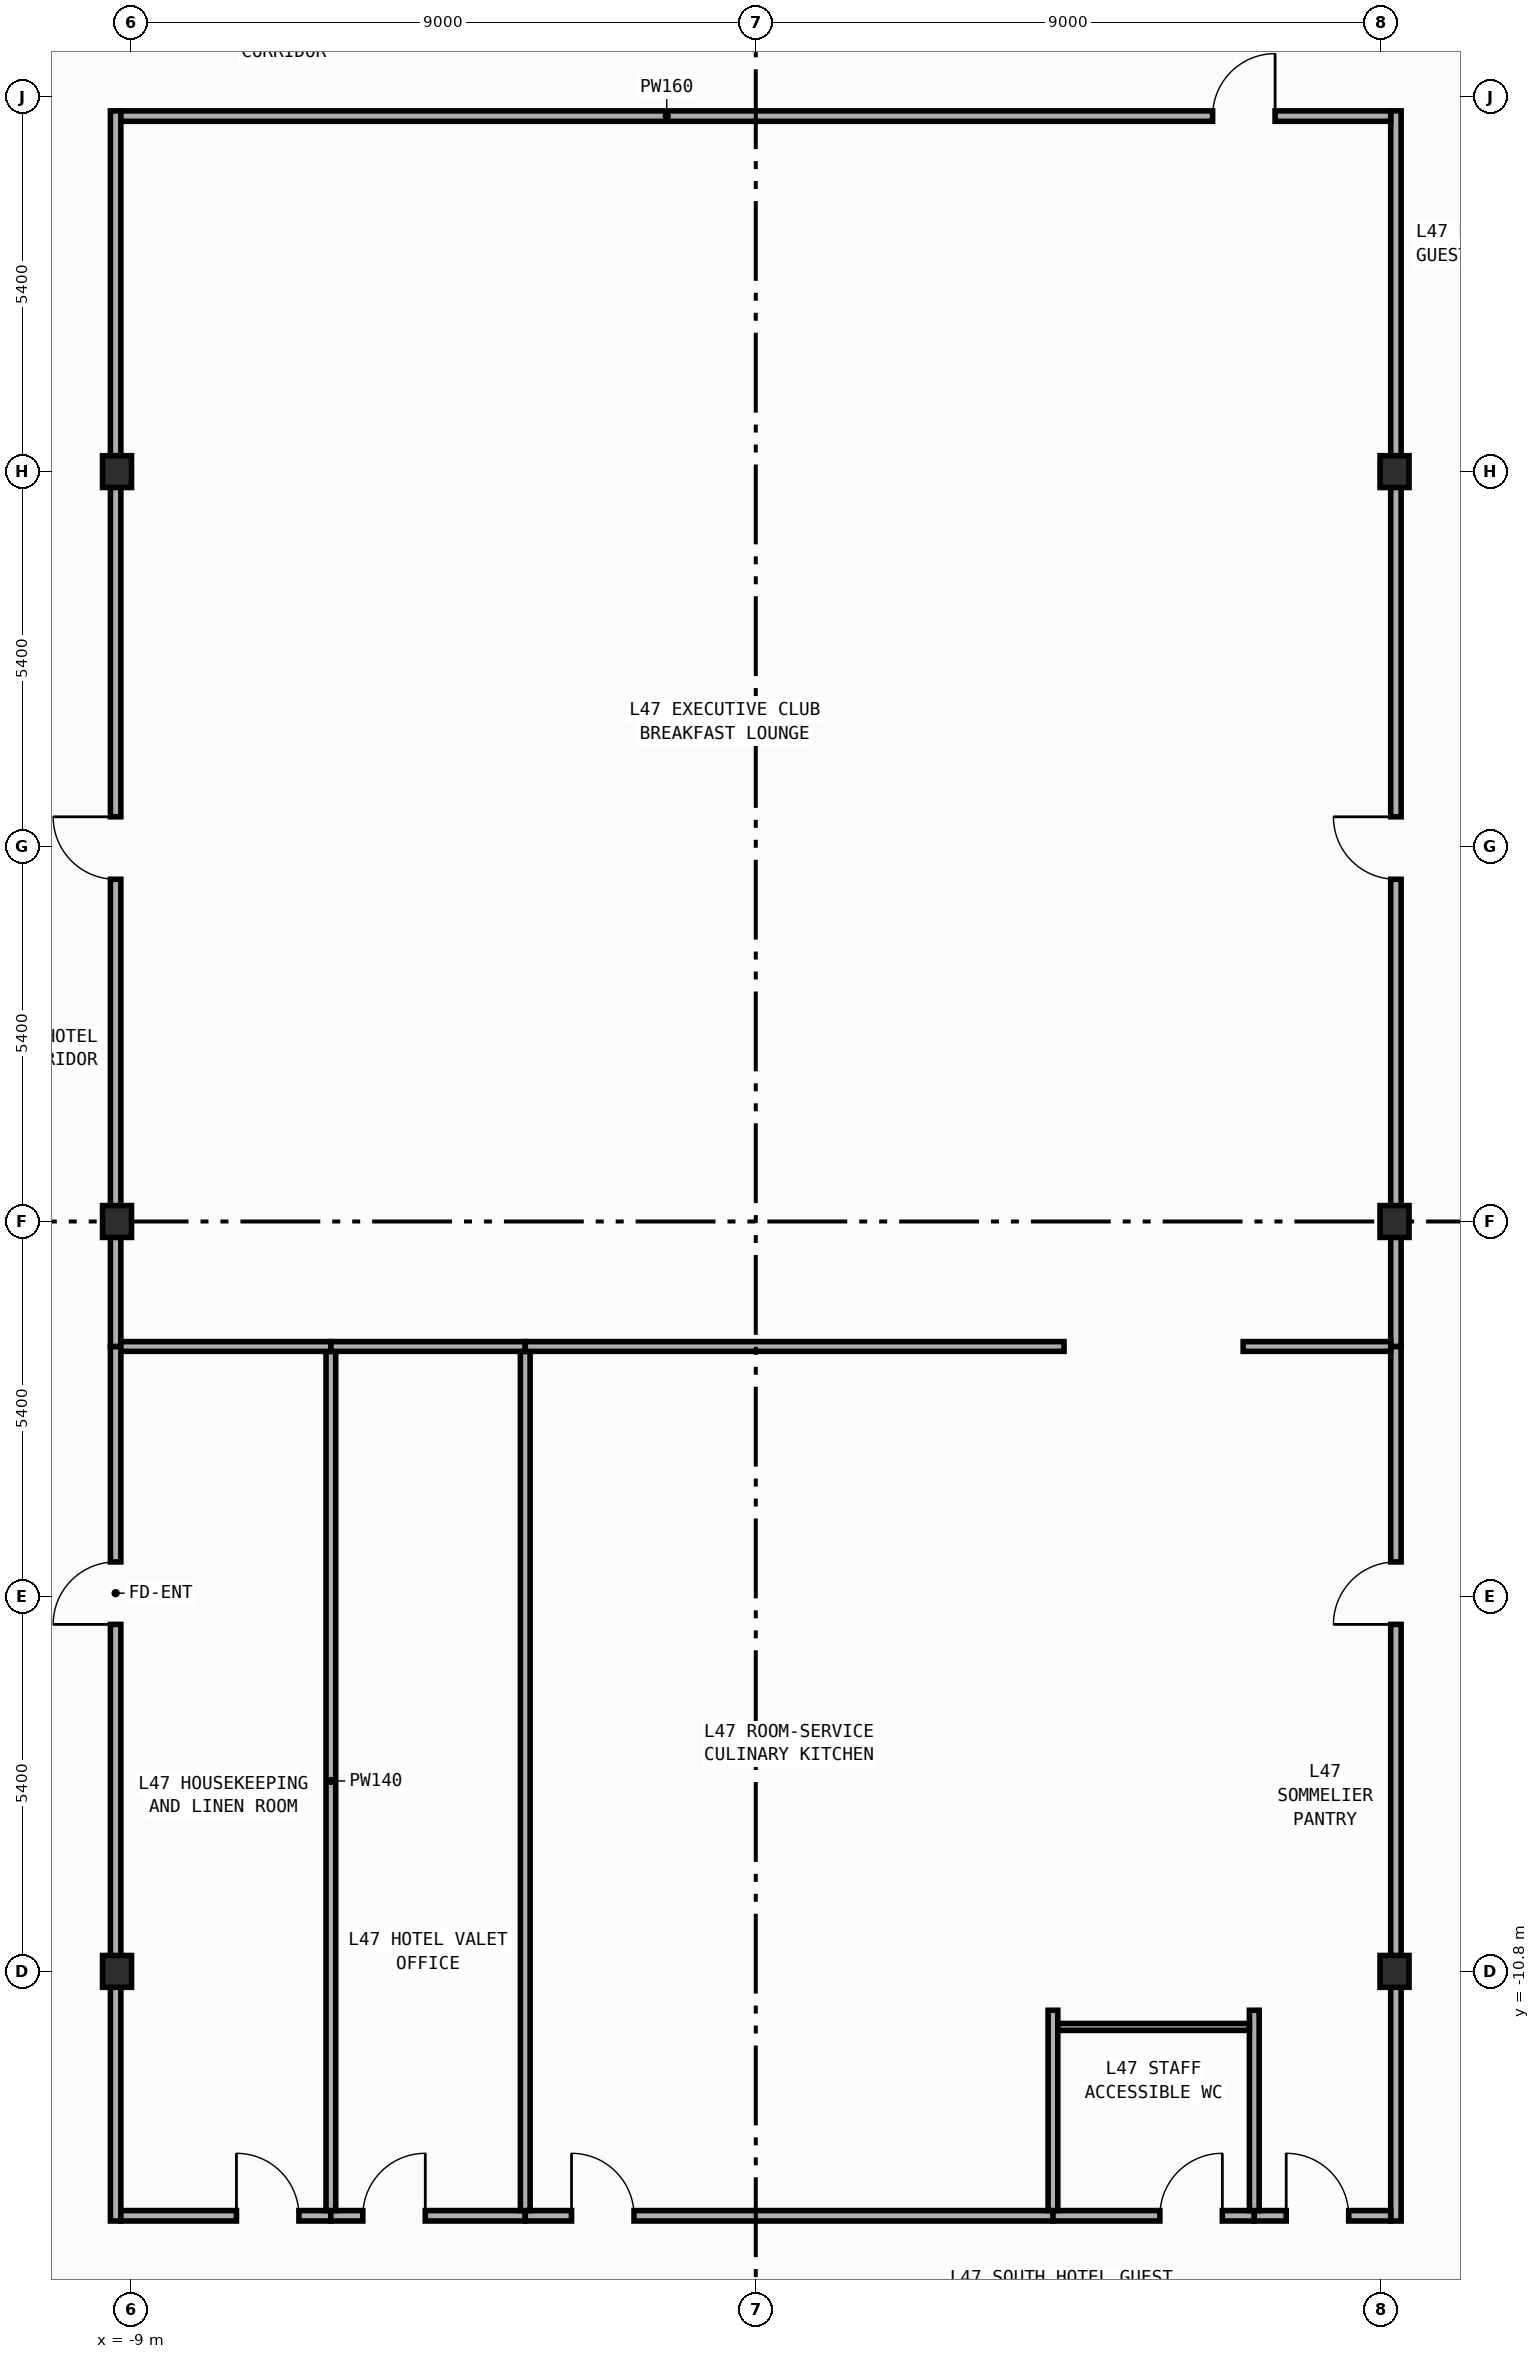
"""IFC4 building model, lengths in metres.
Left out: names, types, materials, properties, quantities, classifications, styles, units other than length and angle.
Written with IfcOpenShell. Run it as: python <this file> out.ifc"""

import sys

from ifc_helpers import new_model, si_unit, direction, frame, frame_2d, origin, origin_2d, place, context, subcontext, project, spatial, rectangle, i_section, extrude, element, fill, save


model = new_model("IFC4")
c1 = context("Model", 3, precision=1e-05, world=origin(), true_north=direction((0.0, 1.0)))
c2 = subcontext(c1, "Body", "Model", "MODEL_VIEW")
j1 = project(units=[si_unit("LENGTHUNIT", "METRE"), si_unit("PLANEANGLEUNIT", "RADIAN")], contexts=[c1])
p1 = place(None, origin())
s1 = spatial("IfcSite", under=j1, at=p1, CompositionType="ELEMENT")
p2 = place(p1, origin())
s2 = spatial("IfcBuilding", under=s1, at=p2, CompositionType="ELEMENT")
p3 = place(p2, frame((0.0, 0.0, 203.0)))
s3 = spatial("IfcBuildingStorey", under=s2, at=p3, CompositionType="ELEMENT", Elevation=203.0)
for number, where, z_axis, x_axis in (
    (1, (-9.2, -10.8, 0.0), (0.0, 0.0, 1.0), (1.0, 0.0, 0.0)),
    (2, (-9.2, 0.0, 0.0), (0.0, 0.0, 1.0), (1.0, 0.0, 0.0)),
    (3, (-9.2, 10.8, 0.0), (0.0, 0.0, 1.0), (1.0, 0.0, 0.0)),
    (4, (9.2, -10.8, 0.0), (0.0, 0.0, 1.0), (1.0, 0.0, 0.0)),
    (5, (9.2, 0.0, 0.0), (0.0, 0.0, 1.0), (1.0, 0.0, 0.0)),
    (6, (9.2, 10.8, 0.0), (0.0, 0.0, 1.0), (1.0, 0.0, 0.0)),
):
    element("IfcColumn", number, at=place(p3, frame(where, z_axis=z_axis, x_axis=x_axis)), inside=s3, PredefinedType="COLUMN", context=c2, shape_type="SweptSolid", body=[
        extrude(i_section(OverallWidth=0.417, OverallDepth=0.458, WebThickness=0.03, FlangeThickness=0.05, FilletRadius=0.022, at=origin_2d()), origin(), (0.0, 0.0, 1.0), 3.8),
    ])
p4 = place(p3, frame((-9.22, -14.395, 0.0), z_axis=(0.0, 0.0, 1.0), x_axis=(0.0, 1.0, 0.0)))
e7 = element("IfcWall", 7, at=p4, inside=s3, PredefinedType="PARTITIONING", context=c2, shape_type="SweptSolid", body=[
    extrude(rectangle(XDim=12.595, YDim=0.15, at=frame_2d((6.297, 0.0))), origin(), (0.0, 0.0, 1.0), 2.952),
])
p5 = place(p4, frame((8.592, 0.0, 0.0)))
e8 = element("IfcOpeningElement", 8, at=p5, cuts=e7, PredefinedType="OPENING", context=c2, shape_type="SweptSolid", body=[
    extrude(rectangle(XDim=0.9, YDim=2.15, at=frame_2d((0.45, 1.075))), frame((0.0, 0.085, 0.0), z_axis=(0.0, -1.0, 0.0), x_axis=(1.0, 0.0, 0.0)), (0.0, 0.0, 1.0), 0.17),
])
p6 = place(p3, frame((-9.22, -1.8, 0.0), z_axis=(0.0, 0.0, 1.0), x_axis=(0.0, 1.0, 0.0)))
e9 = element("IfcWall", 9, at=p6, inside=s3, PredefinedType="PARTITIONING", context=c2, shape_type="SweptSolid", body=[
    extrude(rectangle(XDim=17.795, YDim=0.15, at=frame_2d((8.897, 0.0))), origin(), (0.0, 0.0, 1.0), 2.952),
])
p7 = place(p6, frame((6.729, 0.0, 0.0)))
e10 = element("IfcOpeningElement", 10, at=p7, cuts=e9, PredefinedType="OPENING", context=c2, shape_type="SweptSolid", body=[
    extrude(rectangle(XDim=0.9, YDim=2.15, at=frame_2d((0.45, 1.075))), frame((0.0, 0.085, 0.0), z_axis=(0.0, -1.0, 0.0), x_axis=(1.0, 0.0, 0.0)), (0.0, 0.0, 1.0), 0.17),
])
p8 = place(p3, frame((9.22, -14.395, 0.0), z_axis=(0.0, 0.0, 1.0), x_axis=(0.0, 1.0, 0.0)))
e11 = element("IfcWall", 11, at=p8, inside=s3, PredefinedType="PARTITIONING", context=c2, shape_type="SweptSolid", body=[
    extrude(rectangle(XDim=12.595, YDim=0.15, at=frame_2d((6.297, 0.0))), origin(), (0.0, 0.0, 1.0), 2.952),
])
p9 = place(p8, frame((8.592, 0.0, 0.0)))
e12 = element("IfcOpeningElement", 12, at=p9, cuts=e11, PredefinedType="OPENING", context=c2, shape_type="SweptSolid", body=[
    extrude(rectangle(XDim=0.9, YDim=2.15, at=frame_2d((0.45, 1.075))), frame((0.0, 0.085, 0.0), z_axis=(0.0, -1.0, 0.0), x_axis=(1.0, 0.0, 0.0)), (0.0, 0.0, 1.0), 0.17),
])
p10 = place(p3, frame((9.22, -1.8, 0.0), z_axis=(0.0, 0.0, 1.0), x_axis=(0.0, 1.0, 0.0)))
e13 = element("IfcWall", 13, at=p10, inside=s3, PredefinedType="PARTITIONING", context=c2, shape_type="SweptSolid", body=[
    extrude(rectangle(XDim=17.795, YDim=0.15, at=frame_2d((8.897, 0.0))), origin(), (0.0, 0.0, 1.0), 2.952),
])
p11 = place(p10, frame((6.729, 0.0, 0.0)))
e14 = element("IfcOpeningElement", 14, at=p11, cuts=e13, PredefinedType="OPENING", context=c2, shape_type="SweptSolid", body=[
    extrude(rectangle(XDim=0.9, YDim=2.15, at=frame_2d((0.45, 1.075))), frame((0.0, 0.085, 0.0), z_axis=(0.0, -1.0, 0.0), x_axis=(1.0, 0.0, 0.0)), (0.0, 0.0, 1.0), 0.17),
])
p12 = place(p3, frame((-9.145, 15.92, 0.0), z_axis=(0.0, 0.0, 1.0), x_axis=(1.0, 0.0, 0.0)))
e15 = element("IfcWall", 15, at=p12, inside=s3, PredefinedType="PARTITIONING", context=c2, shape_type="SweptSolid", body=[
    extrude(rectangle(XDim=18.29, YDim=0.15, at=frame_2d((9.145, 0.0))), origin(), (0.0, 0.0, 1.0), 3.54),
])
p13 = place(p12, frame((15.725, 0.0, 0.0)))
e16 = element("IfcOpeningElement", 16, at=p13, cuts=e15, PredefinedType="OPENING", context=c2, shape_type="SweptSolid", body=[
    extrude(rectangle(XDim=0.9, YDim=2.15, at=frame_2d((0.45, 1.075))), frame((0.0, 0.085, 0.0), z_axis=(0.0, -1.0, 0.0), x_axis=(1.0, 0.0, 0.0)), (0.0, 0.0, 1.0), 0.17),
])
p14 = place(p3, frame((-9.145, -14.32, 0.0), z_axis=(0.0, 0.0, 1.0), x_axis=(1.0, 0.0, 0.0)))
e17 = element("IfcWall", 17, at=p14, inside=s3, PredefinedType="PARTITIONING", context=c2, shape_type="SweptSolid", body=[
    extrude(rectangle(XDim=3.025, YDim=0.15, at=frame_2d((1.512, 0.0))), origin(), (0.0, 0.0, 1.0), 3.54),
])
p15 = place(p14, frame((1.665, 0.0, 0.0)))
e18 = element("IfcOpeningElement", 18, at=p15, cuts=e17, PredefinedType="OPENING", context=c2, shape_type="SweptSolid", body=[
    extrude(rectangle(XDim=0.9, YDim=2.15, at=frame_2d((0.45, 1.075))), frame((0.0, 0.085, 0.0), z_axis=(0.0, -1.0, 0.0), x_axis=(1.0, 0.0, 0.0)), (0.0, 0.0, 1.0), 0.17),
])
p16 = place(p3, frame((-6.12, -14.32, 0.0), z_axis=(0.0, 0.0, 1.0), x_axis=(1.0, 0.0, 0.0)))
e19 = element("IfcWall", 19, at=p16, inside=s3, PredefinedType="PARTITIONING", context=c2, shape_type="SweptSolid", body=[
    extrude(rectangle(XDim=2.8, YDim=0.15, at=frame_2d((1.4, 0.0))), origin(), (0.0, 0.0, 1.0), 3.54),
])
p17 = place(p16, frame((0.46, 0.0, 0.0)))
e20 = element("IfcOpeningElement", 20, at=p17, cuts=e19, PredefinedType="OPENING", context=c2, shape_type="SweptSolid", body=[
    extrude(rectangle(XDim=0.9, YDim=2.15, at=frame_2d((0.45, 1.075))), frame((0.0, 0.085, 0.0), z_axis=(0.0, -1.0, 0.0), x_axis=(1.0, 0.0, 0.0)), (0.0, 0.0, 1.0), 0.17),
])
p18 = place(p3, frame((-3.32, -14.32, 0.0), z_axis=(0.0, 0.0, 1.0), x_axis=(1.0, 0.0, 0.0)))
e21 = element("IfcWall", 21, at=p18, inside=s3, PredefinedType="PARTITIONING", context=c2, shape_type="SweptSolid", body=[
    extrude(rectangle(XDim=7.6, YDim=0.15, at=frame_2d((3.8, 0.0))), origin(), (0.0, 0.0, 1.0), 3.54),
])
p19 = place(p18, frame((0.667, 0.0, 0.0)))
e22 = element("IfcOpeningElement", 22, at=p19, cuts=e21, PredefinedType="OPENING", context=c2, shape_type="SweptSolid", body=[
    extrude(rectangle(XDim=0.9, YDim=2.15, at=frame_2d((0.45, 1.075))), frame((0.0, 0.085, 0.0), z_axis=(0.0, -1.0, 0.0), x_axis=(1.0, 0.0, 0.0)), (0.0, 0.0, 1.0), 0.17),
])
p20 = place(p3, frame((4.28, -14.32, 0.0), z_axis=(0.0, 0.0, 1.0), x_axis=(1.0, 0.0, 0.0)))
e23 = element("IfcWall", 23, at=p20, inside=s3, PredefinedType="PARTITIONING", context=c2, shape_type="SweptSolid", body=[
    extrude(rectangle(XDim=2.9, YDim=0.15, at=frame_2d((1.45, 0.0))), origin(), (0.0, 0.0, 1.0), 3.54),
])
p21 = place(p20, frame((1.54, 0.0, 0.0)))
e24 = element("IfcOpeningElement", 24, at=p21, cuts=e23, PredefinedType="OPENING", context=c2, shape_type="SweptSolid", body=[
    extrude(rectangle(XDim=0.9, YDim=2.15, at=frame_2d((0.45, 1.075))), frame((0.0, 0.085, 0.0), z_axis=(0.0, -1.0, 0.0), x_axis=(1.0, 0.0, 0.0)), (0.0, 0.0, 1.0), 0.17),
])
p22 = place(p3, frame((7.18, -14.32, 0.0), z_axis=(0.0, 0.0, 1.0), x_axis=(1.0, 0.0, 0.0)))
e25 = element("IfcWall", 25, at=p22, inside=s3, PredefinedType="PARTITIONING", context=c2, shape_type="SweptSolid", body=[
    extrude(rectangle(XDim=1.965, YDim=0.15, at=frame_2d((0.982, 0.0))), origin(), (0.0, 0.0, 1.0), 3.54),
])
p23 = place(p22, frame((0.46, 0.0, 0.0)))
e26 = element("IfcOpeningElement", 26, at=p23, cuts=e25, PredefinedType="OPENING", context=c2, shape_type="SweptSolid", body=[
    extrude(rectangle(XDim=0.9, YDim=2.15, at=frame_2d((0.45, 1.075))), frame((0.0, 0.085, 0.0), z_axis=(0.0, -1.0, 0.0), x_axis=(1.0, 0.0, 0.0)), (0.0, 0.0, 1.0), 0.17),
])
p24 = place(p3, frame((-6.12, -14.245, 0.0), z_axis=(0.0, 0.0, 1.0), x_axis=(0.0, 1.0, 0.0)))
e27 = element("IfcWall", 27, at=p24, inside=s3, PredefinedType="PARTITIONING", context=c2, shape_type="SweptSolid", body=[
    extrude(rectangle(XDim=12.375, YDim=0.14, at=frame_2d((6.188, 0.0))), origin(), (0.0, 0.0, 1.0), 3.54),
])
p25 = place(p3, frame((-9.145, -1.8, 0.0), z_axis=(0.0, 0.0, 1.0), x_axis=(1.0, 0.0, 0.0)))
e28 = element("IfcWall", 28, at=p25, inside=s3, PredefinedType="PARTITIONING", context=c2, shape_type="SweptSolid", body=[
    extrude(rectangle(XDim=3.025, YDim=0.14, at=frame_2d((1.512, 0.0))), origin(), (0.0, 0.0, 1.0), 3.54),
])
p26 = place(p3, frame((-3.32, -14.245, 0.0), z_axis=(0.0, 0.0, 1.0), x_axis=(0.0, 1.0, 0.0)))
e29 = element("IfcWall", 29, at=p26, inside=s3, PredefinedType="PARTITIONING", context=c2, shape_type="SweptSolid", body=[
    extrude(rectangle(XDim=12.375, YDim=0.14, at=frame_2d((6.188, 0.0))), origin(), (0.0, 0.0, 1.0), 3.54),
])
p27 = place(p3, frame((-6.12, -1.8, 0.0), z_axis=(0.0, 0.0, 1.0), x_axis=(1.0, 0.0, 0.0)))
e30 = element("IfcWall", 30, at=p27, inside=s3, PredefinedType="PARTITIONING", context=c2, shape_type="SweptSolid", body=[
    extrude(rectangle(XDim=2.8, YDim=0.14, at=frame_2d((1.4, 0.0))), origin(), (0.0, 0.0, 1.0), 3.54),
])
p28 = place(p3, frame((4.28, -14.245, 0.0), z_axis=(0.0, 0.0, 1.0), x_axis=(0.0, 1.0, 0.0)))
e31 = element("IfcWall", 31, at=p28, inside=s3, PredefinedType="PARTITIONING", context=c2, shape_type="SweptSolid", body=[
    extrude(rectangle(XDim=2.885, YDim=0.14, at=frame_2d((1.442, 0.0))), origin(), (0.0, 0.0, 1.0), 3.54),
])
p29 = place(p3, frame((-3.32, -1.8, 0.0), z_axis=(0.0, 0.0, 1.0), x_axis=(1.0, 0.0, 0.0)))
e32 = element("IfcWall", 32, at=p29, inside=s3, PredefinedType="PARTITIONING", context=c2, shape_type="SweptSolid", body=[
    extrude(rectangle(XDim=7.76, YDim=0.14, at=frame_2d((3.88, 0.0))), origin(), (0.0, 0.0, 1.0), 3.54),
])
p30 = place(p3, frame((7.18, -14.245, 0.0), z_axis=(0.0, 0.0, 1.0), x_axis=(0.0, 1.0, 0.0)))
e33 = element("IfcWall", 33, at=p30, inside=s3, PredefinedType="PARTITIONING", context=c2, shape_type="SweptSolid", body=[
    extrude(rectangle(XDim=2.885, YDim=0.14, at=frame_2d((1.442, 0.0))), origin(), (0.0, 0.0, 1.0), 3.54),
])
p31 = place(p3, frame((7.02, -1.8, 0.0), z_axis=(0.0, 0.0, 1.0), x_axis=(1.0, 0.0, 0.0)))
e34 = element("IfcWall", 34, at=p31, inside=s3, PredefinedType="PARTITIONING", context=c2, shape_type="SweptSolid", body=[
    extrude(rectangle(XDim=2.125, YDim=0.14, at=frame_2d((1.062, 0.0))), origin(), (0.0, 0.0, 1.0), 3.54),
])
p32 = place(p3, frame((4.35, -11.6, 0.0), z_axis=(0.0, 0.0, 1.0), x_axis=(1.0, 0.0, 0.0)))
e35 = element("IfcWall", 35, at=p32, inside=s3, PredefinedType="PARTITIONING", context=c2, shape_type="SweptSolid", body=[
    extrude(rectangle(XDim=2.76, YDim=0.1, at=frame_2d((1.38, 0.0))), origin(), (0.0, 0.0, 1.0), 3.54),
])
p33 = place(p5, origin())
e36 = element("IfcDoor", 36, at=p33, inside=s3, OperationType="SINGLE_SWING_LEFT", PredefinedType="DOOR", context=c2, shape_type="SweptSolid", body=[
    extrude(rectangle(XDim=0.9, YDim=2.15, at=frame_2d((0.45, 1.075))), frame((0.0, 0.025, 0.0), z_axis=(0.0, -1.0, 0.0), x_axis=(1.0, 0.0, 0.0)), (0.0, 0.0, 1.0), 0.05),
])
fill(e8, e36)
p34 = place(p7, origin())
e37 = element("IfcDoor", 37, at=p34, inside=s3, OperationType="SINGLE_SWING_RIGHT", PredefinedType="DOOR", context=c2, shape_type="SweptSolid", body=[
    extrude(rectangle(XDim=0.9, YDim=2.15, at=frame_2d((0.45, 1.075))), frame((0.0, 0.025, 0.0), z_axis=(0.0, -1.0, 0.0), x_axis=(1.0, 0.0, 0.0)), (0.0, 0.0, 1.0), 0.05),
])
fill(e10, e37)
p35 = place(p9, origin())
e38 = element("IfcDoor", 38, at=p35, inside=s3, OperationType="SINGLE_SWING_LEFT", PredefinedType="DOOR", context=c2, shape_type="SweptSolid", body=[
    extrude(rectangle(XDim=0.9, YDim=2.15, at=frame_2d((0.45, 1.075))), frame((0.0, 0.025, 0.0), z_axis=(0.0, -1.0, 0.0), x_axis=(1.0, 0.0, 0.0)), (0.0, 0.0, 1.0), 0.05),
])
fill(e12, e38)
p36 = place(p11, origin())
e39 = element("IfcDoor", 39, at=p36, inside=s3, OperationType="SINGLE_SWING_RIGHT", PredefinedType="DOOR", context=c2, shape_type="SweptSolid", body=[
    extrude(rectangle(XDim=0.9, YDim=2.15, at=frame_2d((0.45, 1.075))), frame((0.0, 0.025, 0.0), z_axis=(0.0, -1.0, 0.0), x_axis=(1.0, 0.0, 0.0)), (0.0, 0.0, 1.0), 0.05),
])
fill(e14, e39)
p37 = place(p13, origin())
e40 = element("IfcDoor", 40, at=p37, inside=s3, OperationType="SINGLE_SWING_RIGHT", PredefinedType="DOOR", context=c2, shape_type="SweptSolid", body=[
    extrude(rectangle(XDim=0.9, YDim=2.15, at=frame_2d((0.45, 1.075))), frame((0.0, 0.025, 0.0), z_axis=(0.0, -1.0, 0.0), x_axis=(1.0, 0.0, 0.0)), (0.0, 0.0, 1.0), 0.05),
])
fill(e16, e40)
p38 = place(p15, origin())
e41 = element("IfcDoor", 41, at=p38, inside=s3, OperationType="SINGLE_SWING_LEFT", PredefinedType="DOOR", context=c2, shape_type="SweptSolid", body=[
    extrude(rectangle(XDim=0.9, YDim=2.15, at=frame_2d((0.45, 1.075))), frame((0.0, 0.025, 0.0), z_axis=(0.0, -1.0, 0.0), x_axis=(1.0, 0.0, 0.0)), (0.0, 0.0, 1.0), 0.05),
])
fill(e18, e41)
p39 = place(p17, origin())
e42 = element("IfcDoor", 42, at=p39, inside=s3, OperationType="SINGLE_SWING_RIGHT", PredefinedType="DOOR", context=c2, shape_type="SweptSolid", body=[
    extrude(rectangle(XDim=0.9, YDim=2.15, at=frame_2d((0.45, 1.075))), frame((0.0, 0.025, 0.0), z_axis=(0.0, -1.0, 0.0), x_axis=(1.0, 0.0, 0.0)), (0.0, 0.0, 1.0), 0.05),
])
fill(e20, e42)
p40 = place(p19, origin())
e43 = element("IfcDoor", 43, at=p40, inside=s3, OperationType="SINGLE_SWING_LEFT", PredefinedType="DOOR", context=c2, shape_type="SweptSolid", body=[
    extrude(rectangle(XDim=0.9, YDim=2.15, at=frame_2d((0.45, 1.075))), frame((0.0, 0.025, 0.0), z_axis=(0.0, -1.0, 0.0), x_axis=(1.0, 0.0, 0.0)), (0.0, 0.0, 1.0), 0.05),
])
fill(e22, e43)
p41 = place(p21, origin())
e44 = element("IfcDoor", 44, at=p41, inside=s3, OperationType="SINGLE_SWING_RIGHT", PredefinedType="DOOR", context=c2, shape_type="SweptSolid", body=[
    extrude(rectangle(XDim=0.9, YDim=2.15, at=frame_2d((0.45, 1.075))), frame((0.0, 0.025, 0.0), z_axis=(0.0, -1.0, 0.0), x_axis=(1.0, 0.0, 0.0)), (0.0, 0.0, 1.0), 0.05),
])
fill(e24, e44)
p42 = place(p23, origin())
e45 = element("IfcDoor", 45, at=p42, inside=s3, OperationType="SINGLE_SWING_LEFT", PredefinedType="DOOR", context=c2, shape_type="SweptSolid", body=[
    extrude(rectangle(XDim=0.9, YDim=2.15, at=frame_2d((0.45, 1.075))), frame((0.0, 0.025, 0.0), z_axis=(0.0, -1.0, 0.0), x_axis=(1.0, 0.0, 0.0)), (0.0, 0.0, 1.0), 0.05),
])
fill(e26, e45)
save(model, sys.argv[1])
